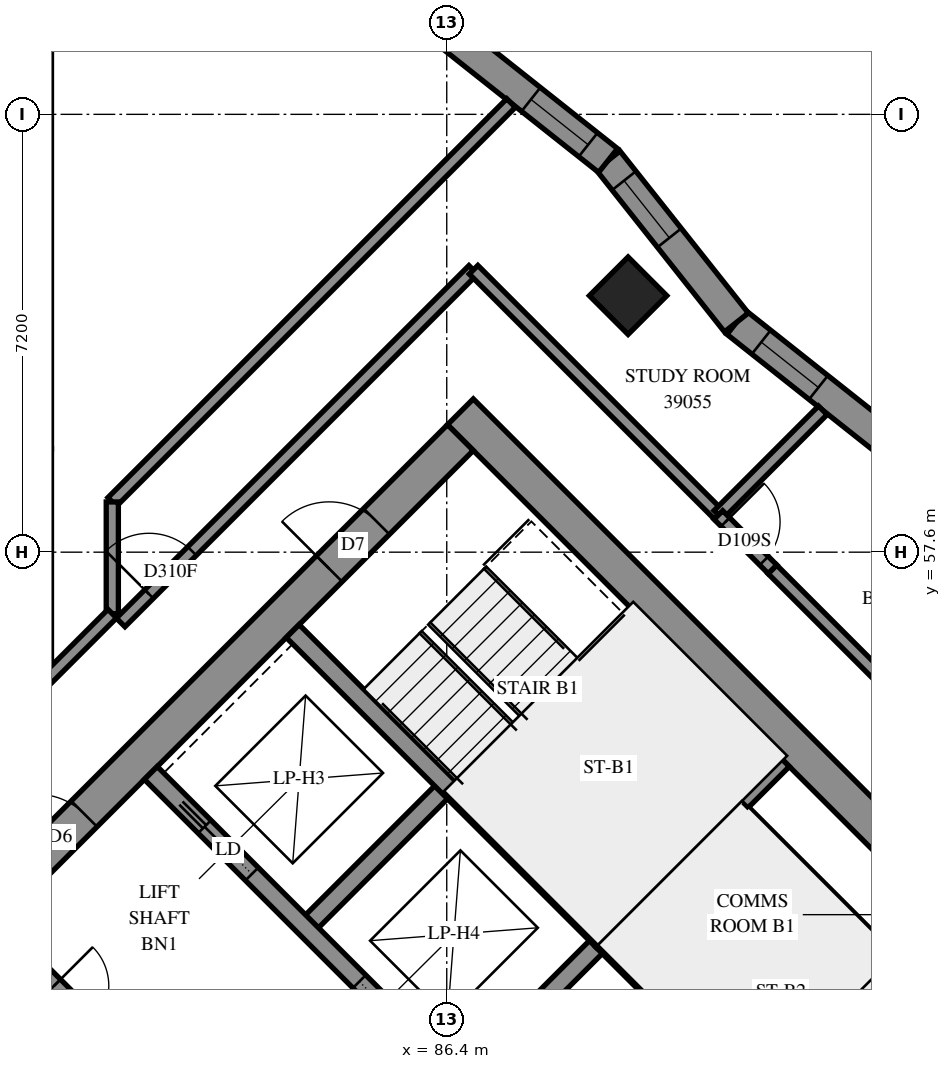
"""IFC4 building model, lengths in metres.
Left out: names, types, materials, properties, quantities, classifications, styles, units other than length and angle.
Written with IfcOpenShell. Run it as: python <this file> out.ifc"""

import sys

from ifc_helpers import new_model, si_unit, direction, frame, frame_2d, origin, origin_2d, place, context, subcontext, project, spatial, polyline, rectangle, outline, extrude, element, fill, save


model = new_model("IFC4")
c1 = context("Model", 3, precision=1e-05, world=origin(), true_north=direction((0.0, 1.0)))
c2 = subcontext(c1, "Body", "Model", "MODEL_VIEW")
j1 = project(units=[si_unit("LENGTHUNIT", "METRE"), si_unit("PLANEANGLEUNIT", "RADIAN")], contexts=[c1])
p1 = place(None, origin())
s1 = spatial("IfcSite", under=j1, at=p1, CompositionType="ELEMENT")
p2 = place(p1, origin())
s2 = spatial("IfcBuilding", under=s1, at=p2, CompositionType="ELEMENT")
p3 = place(p2, frame((0.0, 0.0, 145.6)))
s3 = spatial("IfcBuildingStorey", under=s2, at=p3, CompositionType="ELEMENT", Elevation=145.6)
p4 = place(p3, frame((89.382, 61.818, 0.0), z_axis=(0.0, 0.0, 1.0), x_axis=(0.7071067812, -0.7071067812, 0.0)))
e1 = element("IfcColumn", 1, at=p4, inside=s3, PredefinedType="COLUMN", context=c2, shape_type="SweptSolid", body=[
    extrude(rectangle(XDim=0.9, YDim=0.9, at=origin_2d()), origin(), (0.0, 0.0, 1.0), 3.1),
])
p5 = place(p3, frame((86.625, 59.908, -0.3), z_axis=(0.0, 0.0, 1.0), x_axis=(0.7071067812, -0.7071067812, 0.0)))
e2 = element("IfcWall", 2, at=p5, inside=s3, PredefinedType="SHEAR", context=c2, shape_type="SweptSolid", body=[
    extrude(rectangle(XDim=15.6, YDim=0.6, at=frame_2d((7.8, 0.0))), origin(), (0.0, 0.0, 1.0), 2.7),
])
p6 = place(p5, frame((10.6, 0.0, 0.3)))
e3 = element("IfcOpeningElement", 3, at=p6, cuts=e2, PredefinedType="OPENING", context=c2, shape_type="SweptSolid", body=[
    extrude(rectangle(XDim=0.8, YDim=2.1, at=frame_2d((0.4, 1.05))), frame((0.0, 0.31, 0.0), z_axis=(0.0, -1.0, 0.0), x_axis=(1.0, 0.0, 0.0)), (0.0, 0.0, 1.0), 0.62),
])
p7 = place(p3, frame((76.442, 49.302, -0.3), z_axis=(0.0, 0.0, 1.0), x_axis=(0.7071067812, 0.7071067812, 0.0)))
e4 = element("IfcWall", 4, at=p7, inside=s3, PredefinedType="SHEAR", context=c2, shape_type="SweptSolid", body=[
    extrude(rectangle(XDim=14.4, YDim=0.6, at=frame_2d((7.2, 0.0))), origin(), (0.0, 0.0, 1.0), 2.7),
])
p8 = place(p7, frame((4.55, 0.0, 0.3)))
e5 = element("IfcOpeningElement", 5, at=p8, cuts=e4, PredefinedType="OPENING", context=c2, shape_type="SweptSolid", body=[
    extrude(rectangle(XDim=1.1, YDim=2.1, at=frame_2d((0.55, 1.05))), frame((0.0, 0.31, 0.0), z_axis=(0.0, -1.0, 0.0), x_axis=(1.0, 0.0, 0.0)), (0.0, 0.0, 1.0), 0.62),
])
p9 = place(p7, frame((11.35, 0.0, 0.3)))
e6 = element("IfcOpeningElement", 6, at=p9, cuts=e4, PredefinedType="OPENING", context=c2, shape_type="SweptSolid", body=[
    extrude(rectangle(XDim=1.1, YDim=2.1, at=frame_2d((0.55, 1.05))), frame((0.0, 0.31, 0.0), z_axis=(0.0, -1.0, 0.0), x_axis=(1.0, 0.0, 0.0)), (0.0, 0.0, 1.0), 0.62),
])
p10 = place(p3, frame((84.079, 51.423, 0.0), z_axis=(0.0, 0.0, 1.0), x_axis=(0.7071219326, 0.7070916295, 0.0)))
e7 = element("IfcWall", 7, at=p10, inside=s3, PredefinedType="SOLIDWALL", context=c2, shape_type="SweptSolid", body=[
    extrude(rectangle(XDim=3.3, YDim=0.3, at=frame_2d((1.65, 0.0))), origin(), (0.0, 0.0, 1.0), 3.1),
])
p11 = place(p3, frame((86.625, 48.878, 0.0), z_axis=(0.0, 0.0, 1.0), x_axis=(0.7071067812, 0.7071067812, 0.0)))
e8 = element("IfcWall", 8, at=p11, inside=s3, PredefinedType="SOLIDWALL", context=c2, shape_type="SweptSolid", body=[
    extrude(rectangle(XDim=3.3, YDim=0.3, at=frame_2d((1.65, 0.0))), origin(), (0.0, 0.0, 1.0), 3.1),
])
p12 = place(p3, frame((78.988, 51.423, 0.0), z_axis=(0.0, 0.0, 1.0), x_axis=(0.7071067812, -0.7071067812, 0.0)))
e9 = element("IfcWall", 9, at=p12, inside=s3, PredefinedType="SOLIDWALL", context=c2, shape_type="SweptSolid", body=[
    extrude(rectangle(XDim=14.4, YDim=0.3, at=frame_2d((7.2, 0.0))), origin(), (0.0, 0.0, 1.0), 3.1),
])
p13 = place(p12, frame((1.35, 0.0, 0.0)))
e10 = element("IfcOpeningElement", 10, at=p13, cuts=e9, PredefinedType="OPENING", context=c2, shape_type="SweptSolid", body=[
    extrude(rectangle(XDim=0.9, YDim=2.1, at=frame_2d((0.45, 1.05))), frame((0.0, 0.16, 0.0), z_axis=(0.0, -1.0, 0.0), x_axis=(1.0, 0.0, 0.0)), (0.0, 0.0, 1.0), 0.32),
])
p14 = place(p12, frame((4.95, 0.0, 0.0)))
e11 = element("IfcOpeningElement", 11, at=p14, cuts=e9, PredefinedType="OPENING", context=c2, shape_type="SweptSolid", body=[
    extrude(rectangle(XDim=0.9, YDim=2.1, at=frame_2d((0.45, 1.05))), frame((0.0, 0.16, 0.0), z_axis=(0.0, -1.0, 0.0), x_axis=(1.0, 0.0, 0.0)), (0.0, 0.0, 1.0), 0.32),
])
p15 = place(p12, frame((8.55, 0.0, 0.0)))
e12 = element("IfcOpeningElement", 12, at=p15, cuts=e9, PredefinedType="OPENING", context=c2, shape_type="SweptSolid", body=[
    extrude(rectangle(XDim=0.9, YDim=2.1, at=frame_2d((0.45, 1.05))), frame((0.0, 0.16, 0.0), z_axis=(0.0, -1.0, 0.0), x_axis=(1.0, 0.0, 0.0)), (0.0, 0.0, 1.0), 0.32),
])
p16 = place(p12, frame((12.05, 0.0, 0.0)))
e13 = element("IfcOpeningElement", 13, at=p16, cuts=e9, PredefinedType="OPENING", context=c2, shape_type="SweptSolid", body=[
    extrude(rectangle(XDim=1.1, YDim=2.1, at=frame_2d((0.55, 1.05))), frame((0.0, 0.16, 0.0), z_axis=(0.0, -1.0, 0.0), x_axis=(1.0, 0.0, 0.0)), (0.0, 0.0, 1.0), 0.32),
])
p17 = place(p3, frame((81.534, 53.969, 0.0), z_axis=(0.0, 0.0, 1.0), x_axis=(0.707103309, -0.7071102534, 0.0)))
e14 = element("IfcWall", 14, at=p17, inside=s3, PredefinedType="SOLIDWALL", context=c2, shape_type="SweptSolid", body=[
    extrude(rectangle(XDim=14.4, YDim=0.3, at=frame_2d((7.2, 0.0))), origin(), (0.0, 0.0, 1.0), 3.1),
])
p18 = place(p17, frame((1.25, 0.0, 0.0)))
e15 = element("IfcOpeningElement", 15, at=p18, cuts=e14, PredefinedType="OPENING", context=c2, shape_type="SweptSolid", body=[
    extrude(rectangle(XDim=1.1, YDim=2.1, at=frame_2d((0.55, 1.05))), frame((0.0, 0.16, 0.0), z_axis=(0.0, -1.0, 0.0), x_axis=(1.0, 0.0, 0.0)), (0.0, 0.0, 1.0), 0.32),
])
p19 = place(p17, frame((4.85, 0.0, 0.0)))
e16 = element("IfcOpeningElement", 16, at=p19, cuts=e14, PredefinedType="OPENING", context=c2, shape_type="SweptSolid", body=[
    extrude(rectangle(XDim=1.1, YDim=2.1, at=frame_2d((0.55, 1.05))), frame((0.0, 0.16, 0.0), z_axis=(0.0, -1.0, 0.0), x_axis=(1.0, 0.0, 0.0)), (0.0, 0.0, 1.0), 0.32),
])
p20 = place(p17, frame((8.45, 0.0, 0.0)))
e17 = element("IfcOpeningElement", 17, at=p20, cuts=e14, PredefinedType="OPENING", context=c2, shape_type="SweptSolid", body=[
    extrude(rectangle(XDim=1.1, YDim=2.1, at=frame_2d((0.55, 1.05))), frame((0.0, 0.16, 0.0), z_axis=(0.0, -1.0, 0.0), x_axis=(1.0, 0.0, 0.0)), (0.0, 0.0, 1.0), 0.32),
])
p21 = place(p17, frame((12.05, 0.0, 0.0)))
e18 = element("IfcOpeningElement", 18, at=p21, cuts=e14, PredefinedType="OPENING", context=c2, shape_type="SweptSolid", body=[
    extrude(rectangle(XDim=1.1, YDim=2.1, at=frame_2d((0.55, 1.05))), frame((0.0, 0.16, 0.0), z_axis=(0.0, -1.0, 0.0), x_axis=(1.0, 0.0, 0.0)), (0.0, 0.0, 1.0), 0.32),
])
for number, where, z_axis, x_axis in (
    (19, (83.867, 56.302, 0.0), (0.0, 0.0, 1.0), (0.707, -0.707, 0.0)),
    (20, (88.958, 51.211, 0.0), (0.0, 0.0, 1.0), (0.707, -0.707, 0.0)),
):
    element("IfcWall", number, at=place(p3, frame(where, z_axis=z_axis, x_axis=x_axis)), inside=s3, PredefinedType="SOLIDWALL", context=c2, shape_type="SweptSolid", body=[
        extrude(rectangle(XDim=7.2, YDim=0.3, at=frame_2d((3.6, 0.0))), origin(), (0.0, 0.0, 1.0), 3.1),
    ])
p22 = place(p3, frame((88.958, 51.211, 0.0), z_axis=(0.0, 0.0, 1.0), x_axis=(0.7071067812, 0.7071067812, 0.0)))
e21 = element("IfcWall", 21, at=p22, inside=s3, PredefinedType="SOLIDWALL", context=c2, shape_type="SweptSolid", body=[
    extrude(rectangle(XDim=4.2, YDim=0.3, at=frame_2d((2.1, 0.0))), origin(), (0.0, 0.0, 1.0), 3.1),
])
p23 = place(p3, frame((93.827, 59.267, 0.0), z_axis=(0.0, 0.0, 1.0), x_axis=(-0.7837772273, 0.6210420742, 0.0)))
e22 = element("IfcWall", 22, at=p23, inside=s3, PredefinedType="SOLIDWALL", context=c2, shape_type="SweptSolid", body=[
    extrude(outline(polyline([(-0.029, -0.25), (3.369, -0.25), (3.427, 0.25), (0.029, 0.25), (-0.029, -0.25)])), origin(), (0.0, 0.0, 1.0), 3.1),
])
p24 = place(p23, frame((1.677, 0.0, 0.45)))
e23 = element("IfcOpeningElement", 23, at=p24, cuts=e22, PredefinedType="OPENING", context=c2, shape_type="SweptSolid", body=[
    extrude(rectangle(XDim=1.2, YDim=2.5, at=frame_2d((0.6, 1.25))), frame((0.0, 0.26, 0.0), z_axis=(0.0, -1.0, 0.0), x_axis=(1.0, 0.0, 0.0)), (0.0, 0.0, 1.0), 0.52),
])
p25 = place(p3, frame((91.163, 61.378, 0.0), z_axis=(0.0, 0.0, 1.0), x_axis=(-0.6210277503, 0.783788577, 0.0)))
e24 = element("IfcWall", 24, at=p25, inside=s3, PredefinedType="SOLIDWALL", context=c2, shape_type="SweptSolid", body=[
    extrude(outline(polyline([(0.029, -0.25), (3.427, -0.25), (3.369, 0.25), (-0.029, 0.25), (0.029, -0.25)])), origin(), (0.0, 0.0, 1.0), 3.1),
])
p26 = place(p25, frame((1.775, 0.0, 0.45)))
e25 = element("IfcOpeningElement", 25, at=p26, cuts=e24, PredefinedType="OPENING", context=c2, shape_type="SweptSolid", body=[
    extrude(rectangle(XDim=1.2, YDim=2.5, at=frame_2d((0.6, 1.25))), frame((0.0, 0.26, 0.0), z_axis=(0.0, -1.0, 0.0), x_axis=(1.0, 0.0, 0.0)), (0.0, 0.0, 1.0), 0.52),
])
p27 = place(p3, frame((89.053, 64.041, 0.0), z_axis=(0.0, 0.0, 1.0), x_axis=(-0.7837772273, 0.6210420742, 0.0)))
e26 = element("IfcWall", 26, at=p27, inside=s3, PredefinedType="SOLIDWALL", context=c2, shape_type="SweptSolid", body=[
    extrude(outline(polyline([(-0.029, -0.25), (3.369, -0.25), (3.427, 0.25), (0.029, 0.25), (-0.029, -0.25)])), origin(), (0.0, 0.0, 1.0), 3.1),
])
p28 = place(p27, frame((0.418, 0.0, 0.45)))
e27 = element("IfcOpeningElement", 27, at=p28, cuts=e26, PredefinedType="OPENING", context=c2, shape_type="SweptSolid", body=[
    extrude(rectangle(XDim=1.2, YDim=2.5, at=frame_2d((0.6, 1.25))), frame((0.0, 0.26, 0.0), z_axis=(0.0, -1.0, 0.0), x_axis=(1.0, 0.0, 0.0)), (0.0, 0.0, 1.0), 0.52),
])
p29 = place(p3, frame((91.313, 53.354, 0.0), z_axis=(0.0, 0.0, 1.0), x_axis=(0.7071067812, -0.7071067812, 0.0)))
e28 = element("IfcWall", 28, at=p29, inside=s3, PredefinedType="PARTITIONING", context=c2, shape_type="SweptSolid", body=[
    extrude(rectangle(XDim=5.95, YDim=0.15, at=frame_2d((2.975, 0.0))), origin(), (0.0, 0.0, 1.0), 3.1),
])
p30 = place(p3, frame((91.755, 57.317, 0.0), z_axis=(0.0, 0.0, 1.0), x_axis=(0.7071067812, -0.7071067812, 0.0)))
e29 = element("IfcWall", 29, at=p30, inside=s3, PredefinedType="PARTITIONING", context=c2, shape_type="SweptSolid", body=[
    extrude(rectangle(XDim=11.639, YDim=0.2, at=frame_2d((5.819, 0.0))), origin(), (0.0, 0.0, 1.0), 3.1),
])
p31 = place(p3, frame((80.899, 58.427, 0.0), z_axis=(0.0, 0.0, 1.0), x_axis=(0.7071067812, 0.7071067812, 0.0)))
e30 = element("IfcWall", 30, at=p31, inside=s3, PredefinedType="PARTITIONING", context=c2, shape_type="SweptSolid", body=[
    extrude(rectangle(XDim=9.276, YDim=0.2, at=frame_2d((4.638, 0.0))), origin(), (0.0, 0.0, 1.0), 3.1),
])
p32 = place(p3, frame((81.038, 56.444, 0.0), z_axis=(0.0, 0.0, 1.0), x_axis=(0.7071067812, 0.7071067812, 0.0)))
e31 = element("IfcWall", 31, at=p32, inside=s3, PredefinedType="PARTITIONING", context=c2, shape_type="SweptSolid", body=[
    extrude(rectangle(XDim=8.2, YDim=0.2, at=frame_2d((4.1, 0.0))), origin(), (0.0, 0.0, 1.0), 3.1),
])
p33 = place(p32, frame((0.66, 0.0, 0.0)))
e32 = element("IfcOpeningElement", 32, at=p33, cuts=e31, PredefinedType="OPENING", context=c2, shape_type="SweptSolid", body=[
    extrude(rectangle(XDim=1.0, YDim=2.1, at=frame_2d((0.5, 1.05))), frame((0.0, 0.11, 0.0), z_axis=(0.0, -1.0, 0.0), x_axis=(1.0, 0.0, 0.0)), (0.0, 0.0, 1.0), 0.22),
])
p34 = place(p3, frame((86.841, 62.245, 0.0), z_axis=(0.0, 0.0, 1.0), x_axis=(0.7071067812, -0.7071067812, 0.0)))
e33 = element("IfcWall", 33, at=p34, inside=s3, PredefinedType="PARTITIONING", context=c2, shape_type="SweptSolid", body=[
    extrude(rectangle(XDim=5.699, YDim=0.2, at=frame_2d((2.85, 0.0))), origin(), (0.0, 0.0, 1.0), 3.1),
])
p35 = place(p3, frame((90.867, 58.213, 0.0), z_axis=(0.0, 0.0, 1.0), x_axis=(0.7066128767, 0.7076003409, 0.0)))
e34 = element("IfcWall", 34, at=p35, inside=s3, PredefinedType="PARTITIONING", context=c2, shape_type="SweptSolid", body=[
    extrude(rectangle(XDim=2.43, YDim=0.2, at=frame_2d((1.215, 0.0))), origin(), (0.0, 0.0, 1.0), 3.1),
])
p36 = place(p3, frame((80.9, 56.588, 0.0), z_axis=(0.0, 0.0, 1.0), x_axis=(0.0, 1.0, 0.0)))
e35 = element("IfcWall", 35, at=p36, inside=s3, PredefinedType="PARTITIONING", context=c2, shape_type="SweptSolid", body=[
    extrude(rectangle(XDim=1.838, YDim=0.2, at=frame_2d((0.919, 0.0))), origin(), (0.0, 0.0, 1.0), 3.1),
])
p37 = place(p3, frame((79.801, 55.491, 0.0), z_axis=(0.0, 0.0, 1.0), x_axis=(0.7071067812, 0.7071067812, 0.0)))
e36 = element("IfcWall", 36, at=p37, inside=s3, PredefinedType="PARTITIONING", context=c2, shape_type="SweptSolid", body=[
    extrude(rectangle(XDim=1.553, YDim=0.2, at=frame_2d((0.776, 0.0))), origin(), (0.0, 0.0, 1.0), 3.1),
])
p38 = place(p3, frame((90.867, 58.211, 0.0), z_axis=(0.0, 0.0, 1.0), x_axis=(0.706312726, -0.7078999456, 0.0)))
e37 = element("IfcWall", 37, at=p38, inside=s3, PredefinedType="PARTITIONING", context=c2, shape_type="SweptSolid", body=[
    extrude(rectangle(XDim=1.26, YDim=0.2, at=frame_2d((0.63, 0.0))), origin(), (0.0, 0.0, 1.0), 3.1),
])
p39 = place(p38, frame((0.162, 0.0, 0.0)))
e38 = element("IfcOpeningElement", 38, at=p39, cuts=e37, PredefinedType="OPENING", context=c2, shape_type="SweptSolid", body=[
    extrude(rectangle(XDim=0.9, YDim=2.1, at=frame_2d((0.45, 1.05))), frame((0.0, 0.11, 0.0), z_axis=(0.0, -1.0, 0.0), x_axis=(1.0, 0.0, 0.0)), (0.0, 0.0, 1.0), 0.22),
])
p40 = place(p24, origin())
e39 = element("IfcWindow", 39, at=p40, inside=s3, PartitioningType="SINGLE_PANEL", PredefinedType="WINDOW", context=c2, shape_type="SweptSolid", body=[
    extrude(rectangle(XDim=1.2, YDim=2.5, at=frame_2d((0.6, 1.25))), frame((0.0, 0.18, 0.0), z_axis=(0.0, -1.0, 0.0), x_axis=(1.0, 0.0, 0.0)), (0.0, 0.0, 1.0), 0.06),
])
fill(e23, e39)
p41 = place(p26, origin())
e40 = element("IfcWindow", 40, at=p41, inside=s3, PartitioningType="SINGLE_PANEL", PredefinedType="WINDOW", context=c2, shape_type="SweptSolid", body=[
    extrude(rectangle(XDim=1.2, YDim=2.5, at=frame_2d((0.6, 1.25))), frame((0.0, 0.18, 0.0), z_axis=(0.0, -1.0, 0.0), x_axis=(1.0, 0.0, 0.0)), (0.0, 0.0, 1.0), 0.06),
])
fill(e25, e40)
p42 = place(p28, origin())
e41 = element("IfcWindow", 41, at=p42, inside=s3, PartitioningType="SINGLE_PANEL", PredefinedType="WINDOW", context=c2, shape_type="SweptSolid", body=[
    extrude(rectangle(XDim=1.2, YDim=2.5, at=frame_2d((0.6, 1.25))), frame((0.0, 0.18, 0.0), z_axis=(0.0, -1.0, 0.0), x_axis=(1.0, 0.0, 0.0)), (0.0, 0.0, 1.0), 0.06),
])
fill(e27, e41)
p43 = place(p8, origin())
e42 = element("IfcDoor", 42, at=p43, inside=s3, OperationType="DOUBLE_DOOR_SINGLE_SWING", PredefinedType="DOOR", context=c2, shape_type="SweptSolid", body=[
    extrude(rectangle(XDim=1.1, YDim=2.1, at=frame_2d((0.55, 1.05))), frame((0.0, 0.025, 0.0), z_axis=(0.0, -1.0, 0.0), x_axis=(1.0, 0.0, 0.0)), (0.0, 0.0, 1.0), 0.05),
])
fill(e5, e42)
p44 = place(p9, origin())
e43 = element("IfcDoor", 43, at=p44, inside=s3, OperationType="SINGLE_SWING_LEFT", PredefinedType="DOOR", context=c2, shape_type="SweptSolid", body=[
    extrude(rectangle(XDim=1.1, YDim=2.1, at=frame_2d((0.55, 1.05))), frame((0.0, 0.025, 0.0), z_axis=(0.0, -1.0, 0.0), x_axis=(1.0, 0.0, 0.0)), (0.0, 0.0, 1.0), 0.05),
])
fill(e6, e43)
p45 = place(p13, origin())
e44 = element("IfcDoor", 44, at=p45, inside=s3, OperationType="SINGLE_SWING_LEFT", PredefinedType="DOOR", context=c2, shape_type="SweptSolid", body=[
    extrude(rectangle(XDim=0.9, YDim=2.1, at=frame_2d((0.45, 1.05))), frame((0.0, 0.025, 0.0), z_axis=(0.0, -1.0, 0.0), x_axis=(1.0, 0.0, 0.0)), (0.0, 0.0, 1.0), 0.05),
])
fill(e10, e44)
p46 = place(p18, origin())
e45 = element("IfcDoor", 45, at=p46, inside=s3, OperationType="SLIDING_TO_LEFT", PredefinedType="DOOR", context=c2, shape_type="SweptSolid", body=[
    extrude(rectangle(XDim=1.1, YDim=2.1, at=frame_2d((0.55, 1.05))), frame((0.0, 0.025, 0.0), z_axis=(0.0, -1.0, 0.0), x_axis=(1.0, 0.0, 0.0)), (0.0, 0.0, 1.0), 0.05),
])
fill(e15, e45)
p47 = place(p19, origin())
e46 = element("IfcDoor", 46, at=p47, inside=s3, OperationType="SLIDING_TO_RIGHT", PredefinedType="DOOR", context=c2, shape_type="SweptSolid", body=[
    extrude(rectangle(XDim=1.1, YDim=2.1, at=frame_2d((0.55, 1.05))), frame((0.0, 0.025, 0.0), z_axis=(0.0, -1.0, 0.0), x_axis=(1.0, 0.0, 0.0)), (0.0, 0.0, 1.0), 0.05),
])
fill(e16, e46)
p48 = place(p33, origin())
e47 = element("IfcDoor", 47, at=p48, inside=s3, OperationType="SINGLE_SWING_RIGHT", PredefinedType="DOOR", context=c2, shape_type="SweptSolid", body=[
    extrude(rectangle(XDim=1.0, YDim=2.1, at=frame_2d((0.5, 1.05))), frame((0.0, 0.025, 0.0), z_axis=(0.0, -1.0, 0.0), x_axis=(1.0, 0.0, 0.0)), (0.0, 0.0, 1.0), 0.05),
])
fill(e32, e47)
p49 = place(p39, origin())
e48 = element("IfcDoor", 48, at=p49, inside=s3, OperationType="SINGLE_SWING_RIGHT", PredefinedType="DOOR", context=c2, shape_type="SweptSolid", body=[
    extrude(rectangle(XDim=0.9, YDim=2.1, at=frame_2d((0.45, 1.05))), frame((0.0, 0.025, 0.0), z_axis=(0.0, -1.0, 0.0), x_axis=(1.0, 0.0, 0.0)), (0.0, 0.0, 1.0), 0.05),
])
fill(e38, e48)
save(model, sys.argv[1])
